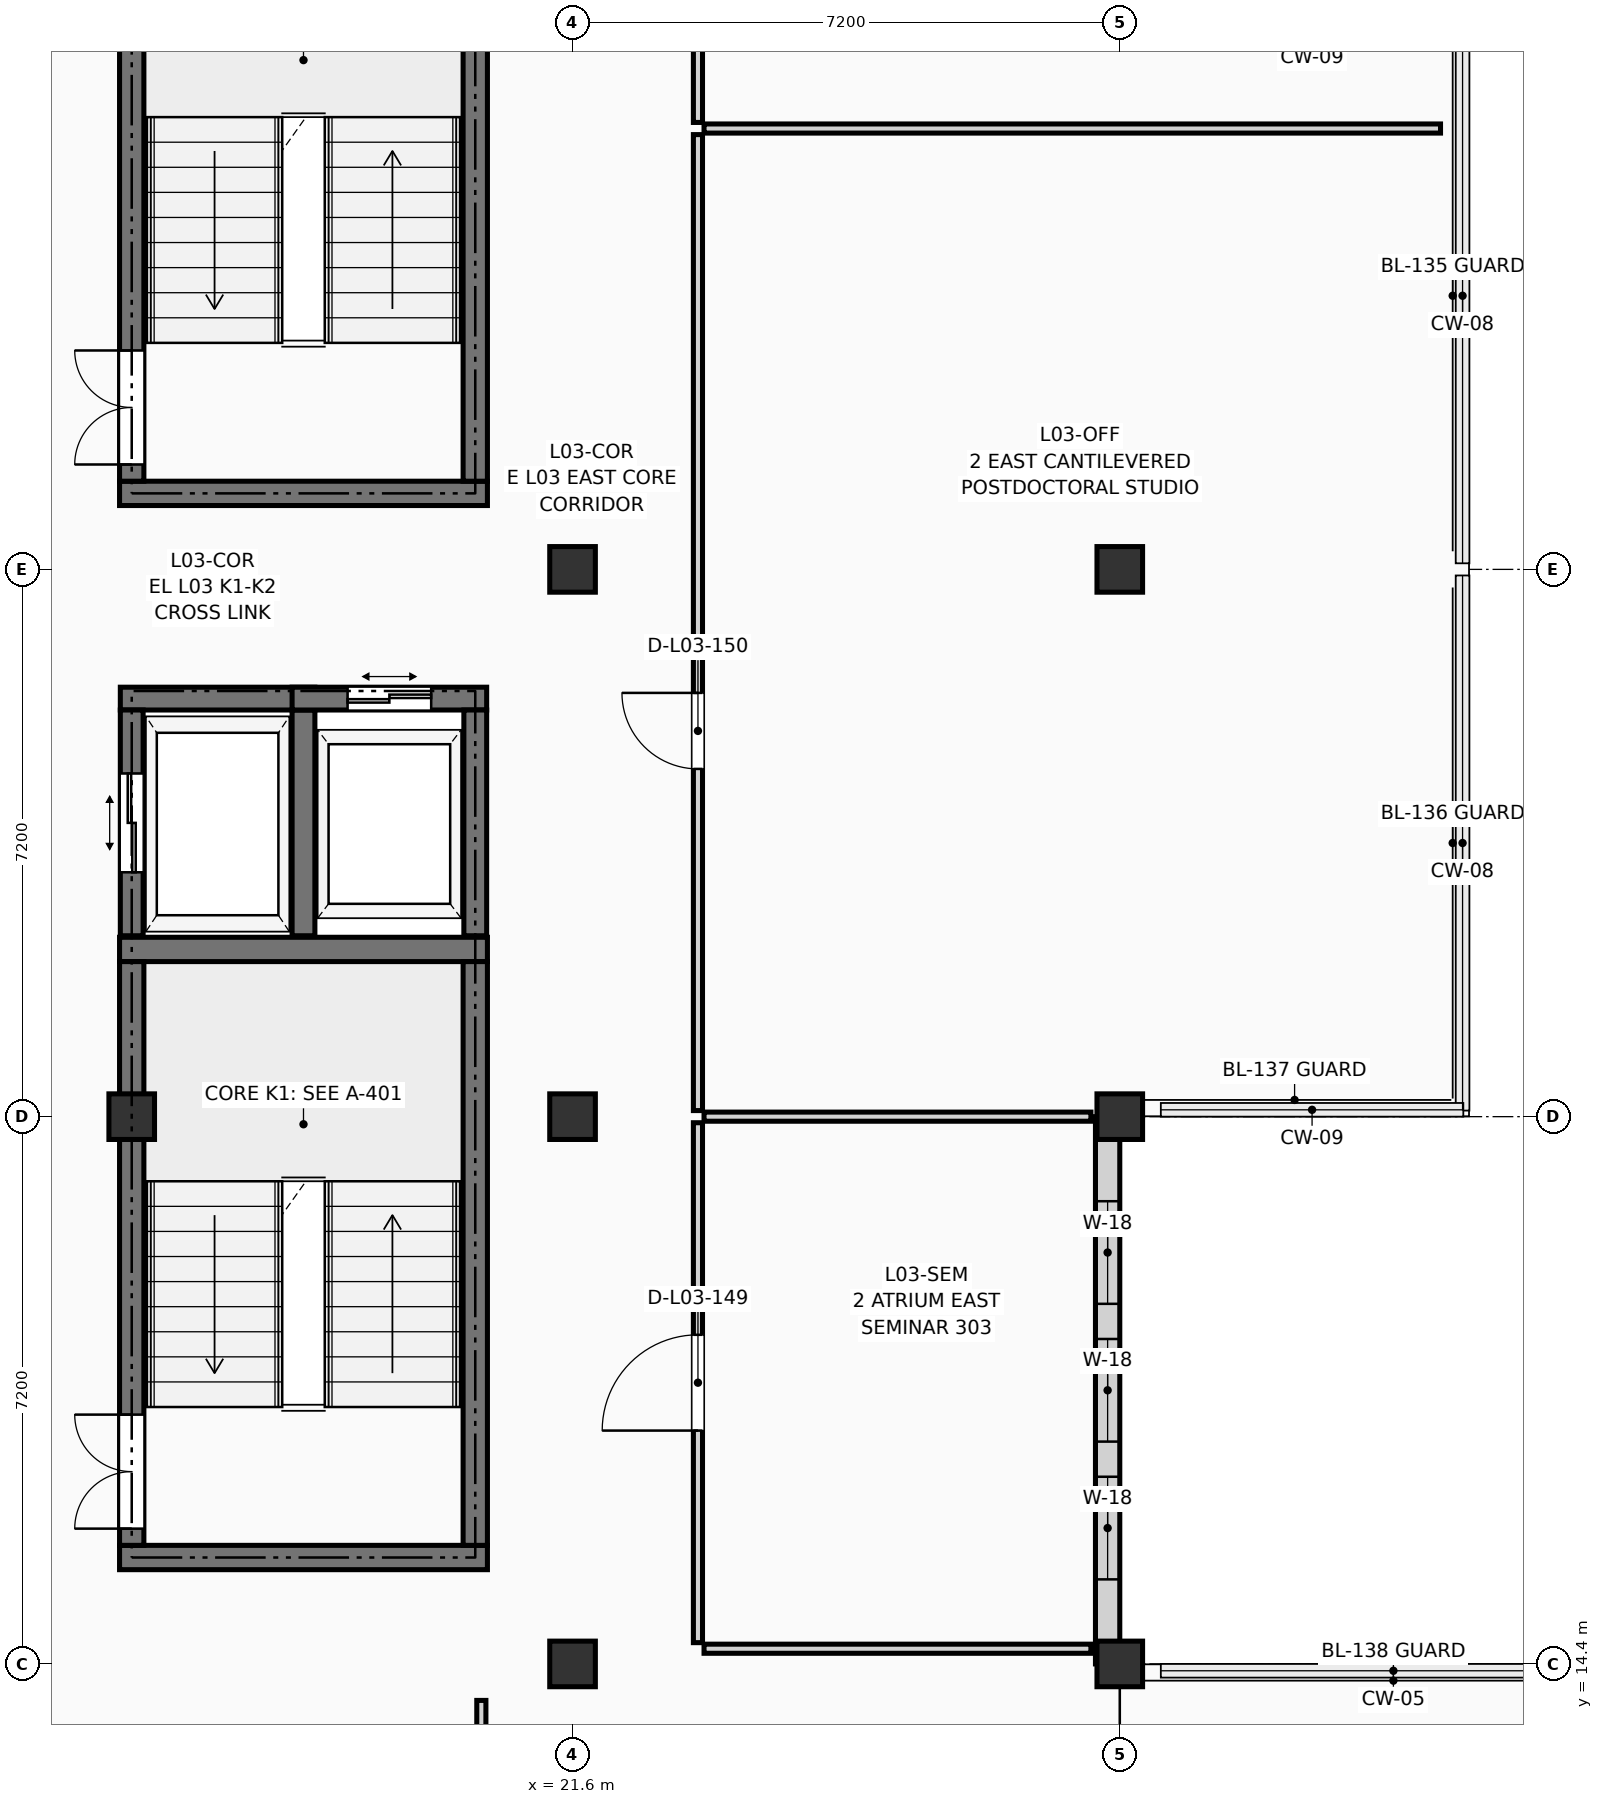
"""IFC4 building model, lengths in metres.
Left out: names, types, materials, properties, quantities, classifications, styles, units other than length and angle.
Written with IfcOpenShell. Run it as: python <this file> out.ifc"""

import sys

from ifc_helpers import new_model, si_unit, direction, frame, frame_2d, origin, origin_2d, place, context, subcontext, project, spatial, rectangle, extrude, element, fill, save


model = new_model("IFC4")
c1 = context("Model", 3, precision=1e-05, world=origin(), true_north=direction((0.0, 1.0)))
c2 = subcontext(c1, "Body", "Model", "MODEL_VIEW")
j1 = project(units=[si_unit("LENGTHUNIT", "METRE"), si_unit("PLANEANGLEUNIT", "RADIAN")], contexts=[c1])
p1 = place(None, origin())
s1 = spatial("IfcSite", under=j1, at=p1, CompositionType="ELEMENT")
p2 = place(p1, origin())
s2 = spatial("IfcBuilding", under=s1, at=p2, CompositionType="ELEMENT")
p3 = place(p2, frame((0.0, 0.0, 12.15)))
s3 = spatial("IfcBuildingStorey", under=s2, at=p3, CompositionType="ELEMENT", Elevation=12.15)
for number, where, z_axis, x_axis in (
    (1, (15.8, 21.6, 0.0), (0.0, 0.0, 1.0), (1.0, 0.0, 0.0)),
    (2, (21.6, 14.4, 0.0), (0.0, 0.0, 1.0), (1.0, 0.0, 0.0)),
    (3, (21.6, 21.6, 0.0), (0.0, 0.0, 1.0), (1.0, 0.0, 0.0)),
    (4, (21.6, 28.8, 0.0), (0.0, 0.0, 1.0), (1.0, 0.0, 0.0)),
    (5, (28.8, 14.4, 0.0), (0.0, 0.0, 1.0), (1.0, 0.0, 0.0)),
    (6, (28.8, 21.6, 0.0), (0.0, 0.0, 1.0), (1.0, 0.0, 0.0)),
    (7, (28.8, 28.8, 0.0), (0.0, 0.0, 1.0), (1.0, 0.0, 0.0)),
):
    element("IfcColumn", number, at=place(p3, frame(where, z_axis=z_axis, x_axis=x_axis)), inside=s3, PredefinedType="COLUMN", context=c2, shape_type="SweptSolid", body=[
        extrude(rectangle(XDim=0.6, YDim=0.6, at=origin_2d()), origin(), (0.0, 0.0, 1.0), 3.6),
    ])
p4 = place(p3, frame((28.64, 14.4, 0.0), z_axis=(0.0, 0.0, 1.0), x_axis=(0.0, 1.0, 0.0)))
e8 = element("IfcWall", 8, at=p4, inside=s3, PredefinedType="SOLIDWALL", context=c2, shape_type="SweptSolid", body=[
    extrude(rectangle(XDim=7.2, YDim=0.32, at=frame_2d((3.6, 0.0))), origin(), (0.0, 0.0, 1.0), 2.84),
])
p5 = place(p4, frame((1.113, 0.0, 0.18)))
e9 = element("IfcOpeningElement", 9, at=p5, cuts=e8, PredefinedType="OPENING", context=c2, shape_type="SweptSolid", body=[
    extrude(rectangle(XDim=1.35, YDim=2.45, at=frame_2d((0.675, 1.225))), frame((0.0, 0.172, 0.0), z_axis=(0.0, -1.0, 0.0), x_axis=(1.0, 0.0, 0.0)), (0.0, 0.0, 1.0), 0.344),
])
p6 = place(p4, frame((2.925, 0.0, 0.18)))
e10 = element("IfcOpeningElement", 10, at=p6, cuts=e8, PredefinedType="OPENING", context=c2, shape_type="SweptSolid", body=[
    extrude(rectangle(XDim=1.35, YDim=2.45, at=frame_2d((0.675, 1.225))), frame((0.0, 0.172, 0.0), z_axis=(0.0, -1.0, 0.0), x_axis=(1.0, 0.0, 0.0)), (0.0, 0.0, 1.0), 0.344),
])
p7 = place(p4, frame((4.738, 0.0, 0.18)))
e11 = element("IfcOpeningElement", 11, at=p7, cuts=e8, PredefinedType="OPENING", context=c2, shape_type="SweptSolid", body=[
    extrude(rectangle(XDim=1.35, YDim=2.45, at=frame_2d((0.675, 1.225))), frame((0.0, 0.172, 0.0), z_axis=(0.0, -1.0, 0.0), x_axis=(1.0, 0.0, 0.0)), (0.0, 0.0, 1.0), 0.344),
])
for number, where, z_axis, x_axis in (
    (12, (15.64, 15.8, 0.0), (0.0, 0.0, 1.0), (1.0, 0.0, 0.0)),
    (13, (15.64, 23.8, 0.0), (0.0, 0.0, 1.0), (1.0, 0.0, 0.0)),
):
    element("IfcWall", number, at=place(p3, frame(where, z_axis=z_axis, x_axis=x_axis)), inside=s3, PredefinedType="SHEAR", context=c2, shape_type="SweptSolid", body=[
        extrude(rectangle(XDim=4.84, YDim=0.32, at=frame_2d((2.42, 0.0))), origin(), (0.0, 0.0, 1.0), 3.39),
    ])
p8 = place(p3, frame((15.8, 15.96, 0.0), z_axis=(0.0, 0.0, 1.0), x_axis=(0.0, 1.0, 0.0)))
e14 = element("IfcWall", 14, at=p8, inside=s3, PredefinedType="SHEAR", context=c2, shape_type="SweptSolid", body=[
    extrude(rectangle(XDim=7.68, YDim=0.32, at=frame_2d((3.84, 0.0))), origin(), (0.0, 0.0, 1.0), 3.39),
])
p9 = place(p8, frame((0.22, 0.0, 0.0)))
e15 = element("IfcOpeningElement", 15, at=p9, cuts=e14, PredefinedType="OPENING", context=c2, shape_type="SweptSolid", body=[
    extrude(rectangle(XDim=1.5, YDim=2.2, at=frame_2d((0.75, 1.1))), frame((0.0, 0.172, 0.0), z_axis=(0.0, -1.0, 0.0), x_axis=(1.0, 0.0, 0.0)), (0.0, 0.0, 1.0), 0.344),
])
p10 = place(p3, frame((20.32, 15.96, 0.0), z_axis=(0.0, 0.0, 1.0), x_axis=(0.0, 1.0, 0.0)))
e16 = element("IfcWall", 16, at=p10, inside=s3, PredefinedType="SHEAR", context=c2, shape_type="SweptSolid", body=[
    extrude(rectangle(XDim=7.68, YDim=0.32, at=frame_2d((3.84, 0.0))), origin(), (0.0, 0.0, 1.0), 3.39),
])
p11 = place(p3, frame((15.64, 29.8, 0.0), z_axis=(0.0, 0.0, 1.0), x_axis=(1.0, 0.0, 0.0)))
e17 = element("IfcWall", 17, at=p11, inside=s3, PredefinedType="SHEAR", context=c2, shape_type="SweptSolid", body=[
    extrude(rectangle(XDim=4.84, YDim=0.32, at=frame_2d((2.42, 0.0))), origin(), (0.0, 0.0, 1.0), 3.39),
])
p12 = place(p3, frame((15.8, 29.96, 0.0), z_axis=(0.0, 0.0, 1.0), x_axis=(0.0, 1.0, 0.0)))
e18 = element("IfcWall", 18, at=p12, inside=s3, PredefinedType="SHEAR", context=c2, shape_type="SweptSolid", body=[
    extrude(rectangle(XDim=7.68, YDim=0.32, at=frame_2d((3.84, 0.0))), origin(), (0.0, 0.0, 1.0), 3.39),
])
p13 = place(p12, frame((0.22, 0.0, 0.0)))
e19 = element("IfcOpeningElement", 19, at=p13, cuts=e18, PredefinedType="OPENING", context=c2, shape_type="SweptSolid", body=[
    extrude(rectangle(XDim=1.5, YDim=2.2, at=frame_2d((0.75, 1.1))), frame((0.0, 0.172, 0.0), z_axis=(0.0, -1.0, 0.0), x_axis=(1.0, 0.0, 0.0)), (0.0, 0.0, 1.0), 0.344),
])
p14 = place(p3, frame((20.32, 29.96, 0.0), z_axis=(0.0, 0.0, 1.0), x_axis=(0.0, 1.0, 0.0)))
e20 = element("IfcWall", 20, at=p14, inside=s3, PredefinedType="SHEAR", context=c2, shape_type="SweptSolid", body=[
    extrude(rectangle(XDim=7.68, YDim=0.32, at=frame_2d((3.84, 0.0))), origin(), (0.0, 0.0, 1.0), 3.39),
])
p15 = place(p3, frame((15.65, 27.1, 0.0), z_axis=(0.0, 0.0, 1.0), x_axis=(1.0, 0.0, 0.0)))
e21 = element("IfcWall", 21, at=p15, inside=s3, PredefinedType="SHEAR", context=c2, shape_type="SweptSolid", body=[
    extrude(rectangle(XDim=2.56, YDim=0.3, at=frame_2d((1.28, 0.0))), origin(), (0.0, 0.0, 1.0), 3.39),
])
p16 = place(p3, frame((15.8, 23.98, 0.0), z_axis=(0.0, 0.0, 1.0), x_axis=(0.0, 1.0, 0.0)))
e22 = element("IfcWall", 22, at=p16, inside=s3, PredefinedType="SHEAR", context=c2, shape_type="SweptSolid", body=[
    extrude(rectangle(XDim=2.97, YDim=0.3, at=frame_2d((1.485, 0.0))), origin(), (0.0, 0.0, 1.0), 3.39),
])
p17 = place(p16, frame((0.835, 0.0, 0.0)))
e23 = element("IfcOpeningElement", 23, at=p17, cuts=e22, PredefinedType="OPENING", context=c2, shape_type="SweptSolid", body=[
    extrude(rectangle(XDim=1.3, YDim=2.25, at=frame_2d((0.65, 1.125))), frame((0.0, 0.162, 0.0), z_axis=(0.0, -1.0, 0.0), x_axis=(1.0, 0.0, 0.0)), (0.0, 0.0, 1.0), 0.324),
])
p18 = place(p3, frame((18.06, 23.98, 0.0), z_axis=(0.0, 0.0, 1.0), x_axis=(0.0, 1.0, 0.0)))
e24 = element("IfcWall", 24, at=p18, inside=s3, PredefinedType="SHEAR", context=c2, shape_type="SweptSolid", body=[
    extrude(rectangle(XDim=2.97, YDim=0.3, at=frame_2d((1.485, 0.0))), origin(), (0.0, 0.0, 1.0), 3.39),
])
p19 = place(p3, frame((17.91, 27.1, 0.0), z_axis=(0.0, 0.0, 1.0), x_axis=(1.0, 0.0, 0.0)))
e25 = element("IfcWall", 25, at=p19, inside=s3, PredefinedType="SHEAR", context=c2, shape_type="SweptSolid", body=[
    extrude(rectangle(XDim=2.56, YDim=0.3, at=frame_2d((1.28, 0.0))), origin(), (0.0, 0.0, 1.0), 3.39),
])
p20 = place(p19, frame((0.73, 0.0, 0.0)))
e26 = element("IfcOpeningElement", 26, at=p20, cuts=e25, PredefinedType="OPENING", context=c2, shape_type="SweptSolid", body=[
    extrude(rectangle(XDim=1.1, YDim=2.2, at=frame_2d((0.55, 1.1))), frame((0.0, 0.162, 0.0), z_axis=(0.0, -1.0, 0.0), x_axis=(1.0, 0.0, 0.0)), (0.0, 0.0, 1.0), 0.324),
])
p21 = place(p3, frame((20.32, 23.98, 0.0), z_axis=(0.0, 0.0, 1.0), x_axis=(0.0, 1.0, 0.0)))
e27 = element("IfcWall", 27, at=p21, inside=s3, PredefinedType="SHEAR", context=c2, shape_type="SweptSolid", body=[
    extrude(rectangle(XDim=2.97, YDim=0.3, at=frame_2d((1.485, 0.0))), origin(), (0.0, 0.0, 1.0), 3.39),
])
p22 = place(p3, frame((20.4, 9.48, 0.0), z_axis=(0.0, 0.0, 1.0), x_axis=(0.0, 1.0, 0.0)))
e28 = element("IfcWall", 28, at=p22, inside=s3, PredefinedType="PARTITIONING", context=c2, shape_type="SweptSolid", body=[
    extrude(rectangle(XDim=4.44, YDim=0.12, at=frame_2d((2.22, 0.0))), origin(), (0.0, 0.0, 1.0), 3.375),
])
p23 = place(p3, frame((23.25, 14.68, 0.0), z_axis=(0.0, 0.0, 1.0), x_axis=(0.0, 1.0, 0.0)))
e29 = element("IfcWall", 29, at=p23, inside=s3, PredefinedType="PARTITIONING", context=c2, shape_type="SweptSolid", body=[
    extrude(rectangle(XDim=6.84, YDim=0.12, at=frame_2d((3.42, 0.0))), origin(), (0.0, 0.0, 1.0), 3.375),
])
p24 = place(p23, frame((2.79, 0.0, 0.0)))
e30 = element("IfcOpeningElement", 30, at=p24, cuts=e29, PredefinedType="OPENING", context=c2, shape_type="SweptSolid", body=[
    extrude(rectangle(XDim=1.26, YDim=2.18, at=frame_2d((0.63, 1.09))), frame((0.0, 0.072, 0.0), z_axis=(0.0, -1.0, 0.0), x_axis=(1.0, 0.0, 0.0)), (0.0, 0.0, 1.0), 0.144),
])
p25 = place(p3, frame((23.33, 14.6, 0.0), z_axis=(0.0, 0.0, 1.0), x_axis=(1.0, 0.0, 0.0)))
e31 = element("IfcWall", 31, at=p25, inside=s3, PredefinedType="PARTITIONING", context=c2, shape_type="SweptSolid", body=[
    extrude(rectangle(XDim=5.09, YDim=0.12, at=frame_2d((2.545, 0.0))), origin(), (0.0, 0.0, 1.0), 2.595),
])
p26 = place(p3, frame((23.33, 21.6, 0.0), z_axis=(0.0, 0.0, 1.0), x_axis=(1.0, 0.0, 0.0)))
e32 = element("IfcWall", 32, at=p26, inside=s3, PredefinedType="PARTITIONING", context=c2, shape_type="SweptSolid", body=[
    extrude(rectangle(XDim=5.09, YDim=0.12, at=frame_2d((2.545, 0.0))), origin(), (0.0, 0.0, 1.0), 2.691),
])
p27 = place(p3, frame((23.25, 21.68, 0.0), z_axis=(0.0, 0.0, 1.0), x_axis=(0.0, 1.0, 0.0)))
e33 = element("IfcWall", 33, at=p27, inside=s3, PredefinedType="PARTITIONING", context=c2, shape_type="SweptSolid", body=[
    extrude(rectangle(XDim=12.84, YDim=0.12, at=frame_2d((6.42, 0.0))), origin(), (0.0, 0.0, 1.0), 3.375),
])
p28 = place(p27, frame((4.495, 0.0, 0.0)))
e34 = element("IfcOpeningElement", 34, at=p28, cuts=e33, PredefinedType="OPENING", context=c2, shape_type="SweptSolid", body=[
    extrude(rectangle(XDim=1.0, YDim=2.15, at=frame_2d((0.5, 1.075))), frame((0.0, 0.072, 0.0), z_axis=(0.0, -1.0, 0.0), x_axis=(1.0, 0.0, 0.0)), (0.0, 0.0, 1.0), 0.144),
])
p29 = place(p3, frame((23.33, 34.6, 0.0), z_axis=(0.0, 0.0, 1.0), x_axis=(1.0, 0.0, 0.0)))
e35 = element("IfcWall", 35, at=p29, inside=s3, PredefinedType="PARTITIONING", context=c2, shape_type="SweptSolid", body=[
    extrude(rectangle(XDim=9.69, YDim=0.12, at=frame_2d((4.845, 0.0))), origin(), (0.0, 0.0, 1.0), 3.375),
])
p30 = place(p3, frame((23.25, 34.68, 0.0), z_axis=(0.0, 0.0, 1.0), x_axis=(0.0, 1.0, 0.0)))
e36 = element("IfcWall", 36, at=p30, inside=s3, PredefinedType="PARTITIONING", context=c2, shape_type="SweptSolid", body=[
    extrude(rectangle(XDim=8.64, YDim=0.12, at=frame_2d((4.32, 0.0))), origin(), (0.0, 0.0, 1.0), 3.375),
])
p31 = place(p5, origin())
e37 = element("IfcWindow", 37, at=p31, inside=s3, PartitioningType="SINGLE_PANEL", PredefinedType="WINDOW", context=c2, shape_type="SweptSolid", body=[
    extrude(rectangle(XDim=1.35, YDim=2.45, at=frame_2d((0.675, 1.225))), frame((0.0, 0.03, 0.0), z_axis=(0.0, -1.0, 0.0), x_axis=(1.0, 0.0, 0.0)), (0.0, 0.0, 1.0), 0.06),
])
fill(e9, e37)
p32 = place(p6, origin())
e38 = element("IfcWindow", 38, at=p32, inside=s3, PartitioningType="SINGLE_PANEL", PredefinedType="WINDOW", context=c2, shape_type="SweptSolid", body=[
    extrude(rectangle(XDim=1.35, YDim=2.45, at=frame_2d((0.675, 1.225))), frame((0.0, 0.03, 0.0), z_axis=(0.0, -1.0, 0.0), x_axis=(1.0, 0.0, 0.0)), (0.0, 0.0, 1.0), 0.06),
])
fill(e10, e38)
p33 = place(p7, origin())
e39 = element("IfcWindow", 39, at=p33, inside=s3, PartitioningType="SINGLE_PANEL", PredefinedType="WINDOW", context=c2, shape_type="SweptSolid", body=[
    extrude(rectangle(XDim=1.35, YDim=2.45, at=frame_2d((0.675, 1.225))), frame((0.0, 0.03, 0.0), z_axis=(0.0, -1.0, 0.0), x_axis=(1.0, 0.0, 0.0)), (0.0, 0.0, 1.0), 0.06),
])
fill(e11, e39)
p34 = place(p9, origin())
e40 = element("IfcDoor", 40, at=p34, inside=s3, OperationType="DOUBLE_DOOR_SINGLE_SWING", PredefinedType="DOOR", context=c2, shape_type="SweptSolid", body=[
    extrude(rectangle(XDim=1.5, YDim=2.2, at=frame_2d((0.75, 1.1))), frame((0.0, 0.025, 0.0), z_axis=(0.0, -1.0, 0.0), x_axis=(1.0, 0.0, 0.0)), (0.0, 0.0, 1.0), 0.05),
])
fill(e15, e40)
p35 = place(p13, origin())
e41 = element("IfcDoor", 41, at=p35, inside=s3, OperationType="DOUBLE_DOOR_SINGLE_SWING", PredefinedType="DOOR", context=c2, shape_type="SweptSolid", body=[
    extrude(rectangle(XDim=1.5, YDim=2.2, at=frame_2d((0.75, 1.1))), frame((0.0, 0.025, 0.0), z_axis=(0.0, -1.0, 0.0), x_axis=(1.0, 0.0, 0.0)), (0.0, 0.0, 1.0), 0.05),
])
fill(e19, e41)
p36 = place(p17, origin())
e42 = element("IfcDoor", 42, at=p36, inside=s3, OperationType="DOUBLE_DOOR_SLIDING", PredefinedType="DOOR", context=c2, shape_type="SweptSolid", body=[
    extrude(rectangle(XDim=1.3, YDim=2.25, at=frame_2d((0.65, 1.125))), frame((0.0, 0.025, 0.0), z_axis=(0.0, -1.0, 0.0), x_axis=(1.0, 0.0, 0.0)), (0.0, 0.0, 1.0), 0.05),
])
fill(e23, e42)
p37 = place(p20, origin())
e43 = element("IfcDoor", 43, at=p37, inside=s3, OperationType="DOUBLE_DOOR_SLIDING", PredefinedType="DOOR", context=c2, shape_type="SweptSolid", body=[
    extrude(rectangle(XDim=1.1, YDim=2.2, at=frame_2d((0.55, 1.1))), frame((0.0, 0.025, 0.0), z_axis=(0.0, -1.0, 0.0), x_axis=(1.0, 0.0, 0.0)), (0.0, 0.0, 1.0), 0.05),
])
fill(e26, e43)
p38 = place(p24, origin())
e44 = element("IfcDoor", 44, at=p38, inside=s3, OperationType="SINGLE_SWING_LEFT", PredefinedType="DOOR", context=c2, shape_type="SweptSolid", body=[
    extrude(rectangle(XDim=1.26, YDim=2.18, at=frame_2d((0.63, 1.09))), frame((0.0, 0.025, 0.0), z_axis=(0.0, -1.0, 0.0), x_axis=(1.0, 0.0, 0.0)), (0.0, 0.0, 1.0), 0.05),
])
fill(e30, e44)
p39 = place(p28, origin())
e45 = element("IfcDoor", 45, at=p39, inside=s3, OperationType="SINGLE_SWING_RIGHT", PredefinedType="DOOR", context=c2, shape_type="SweptSolid", body=[
    extrude(rectangle(XDim=1.0, YDim=2.15, at=frame_2d((0.5, 1.075))), frame((0.0, 0.025, 0.0), z_axis=(0.0, -1.0, 0.0), x_axis=(1.0, 0.0, 0.0)), (0.0, 0.0, 1.0), 0.05),
])
fill(e34, e45)
save(model, sys.argv[1])
